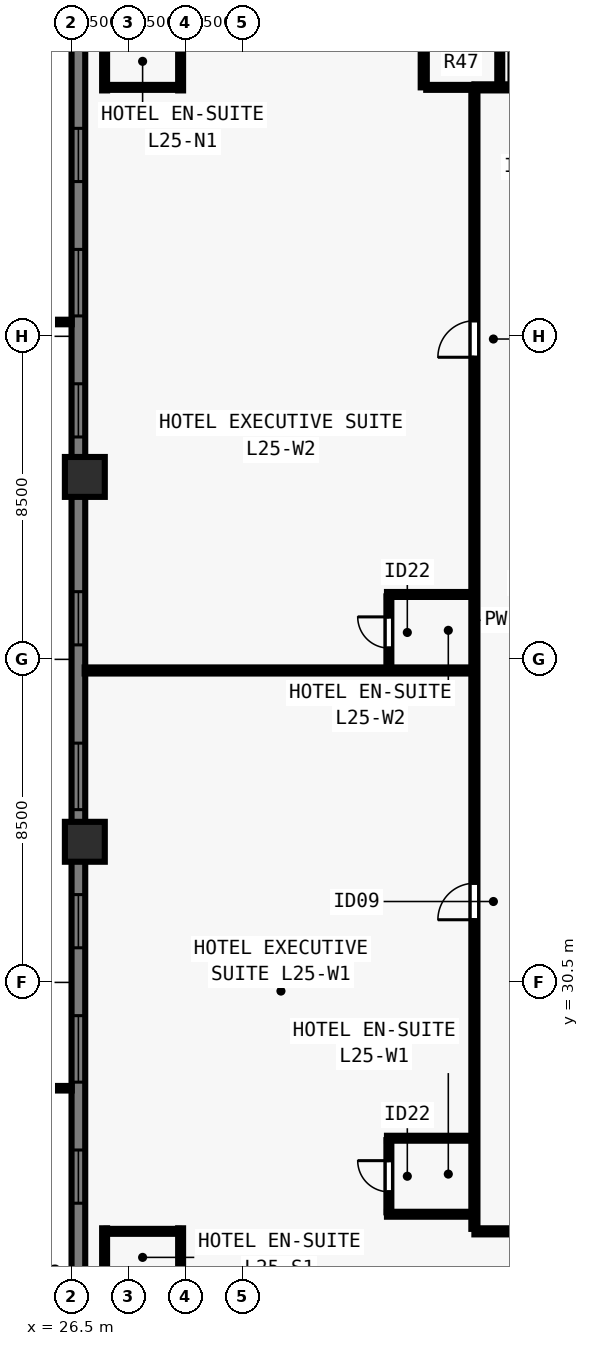
"""IFC4 building model, lengths in metres.
Left out: names, types, materials, properties, quantities, classifications, styles, units other than length and angle.
Written with IfcOpenShell. Run it as: python <this file> out.ifc"""

import sys

from ifc_helpers import new_model, si_unit, direction, frame, frame_2d, origin, origin_2d, place, context, subcontext, project, spatial, rectangle, extrude, element, fill, save


model = new_model("IFC4")
c1 = context("Model", 3, precision=1e-05, world=origin(), true_north=direction((0.0, 1.0)))
c2 = subcontext(c1, "Body", "Model", "MODEL_VIEW")
j1 = project(units=[si_unit("LENGTHUNIT", "METRE"), si_unit("PLANEANGLEUNIT", "RADIAN")], contexts=[c1])
p1 = place(None, origin())
s1 = spatial("IfcSite", under=j1, at=p1, CompositionType="ELEMENT")
p2 = place(p1, origin())
s2 = spatial("IfcBuilding", under=s1, at=p2, CompositionType="ELEMENT")
p3 = place(p2, frame((0.0, 0.0, 93.5)))
s3 = spatial("IfcBuildingStorey", under=s2, at=p3, CompositionType="ELEMENT", Elevation=93.5)
for number, where, z_axis, x_axis in (
    (1, (26.85, 43.8, 0.0), (0.0, 0.0, 1.0), (0.0, 1.0, 0.0)),
    (2, (26.85, 34.2, 0.0), (0.0, 0.0, 1.0), (0.0, 1.0, 0.0)),
):
    element("IfcColumn", number, at=place(p3, frame(where, z_axis=z_axis, x_axis=x_axis)), inside=s3, PredefinedType="COLUMN", context=c2, shape_type="SweptSolid", body=[
        extrude(rectangle(XDim=1.05, YDim=1.05, at=origin_2d()), origin(), (0.0, 0.0, 1.0), 3.5),
    ])
p4 = place(p3, frame((26.68, 16.5, 0.0), z_axis=(0.0, 0.0, 1.0), x_axis=(0.0, 1.0, 0.0)))
e3 = element("IfcWall", 3, at=p4, inside=s3, PredefinedType="SOLIDWALL", context=c2, shape_type="SweptSolid", body=[
    extrude(rectangle(XDim=44.662, YDim=0.36, at=frame_2d((22.331, 0.0))), origin(), (0.0, 0.0, 1.0), 3.24),
])
p5 = place(p4, frame((8.19, 0.0, 0.8)))
e4 = element("IfcOpeningElement", 4, at=p5, cuts=e3, PredefinedType="OPENING", context=c2, shape_type="SweptSolid", body=[
    extrude(rectangle(XDim=1.4, YDim=1.504, at=frame_2d((0.7, 0.752))), frame((0.0, 0.19, 0.0), z_axis=(0.0, -1.0, 0.0), x_axis=(1.0, 0.0, 0.0)), (0.0, 0.0, 1.0), 0.38),
])
p6 = place(p4, frame((11.375, 0.0, 0.8)))
e5 = element("IfcOpeningElement", 5, at=p6, cuts=e3, PredefinedType="OPENING", context=c2, shape_type="SweptSolid", body=[
    extrude(rectangle(XDim=1.75, YDim=1.504, at=frame_2d((0.875, 0.752))), frame((0.0, 0.19, 0.0), z_axis=(0.0, -1.0, 0.0), x_axis=(1.0, 0.0, 0.0)), (0.0, 0.0, 1.0), 0.38),
])
p7 = place(p4, frame((14.911, 0.0, 0.8)))
e6 = element("IfcOpeningElement", 6, at=p7, cuts=e3, PredefinedType="OPENING", context=c2, shape_type="SweptSolid", body=[
    extrude(rectangle(XDim=1.4, YDim=1.504, at=frame_2d((0.7, 0.752))), frame((0.0, 0.19, 0.0), z_axis=(0.0, -1.0, 0.0), x_axis=(1.0, 0.0, 0.0)), (0.0, 0.0, 1.0), 0.38),
])
p8 = place(p4, frame((18.546, 0.0, 0.8)))
e7 = element("IfcOpeningElement", 7, at=p8, cuts=e3, PredefinedType="OPENING", context=c2, shape_type="SweptSolid", body=[
    extrude(rectangle(XDim=1.75, YDim=1.504, at=frame_2d((0.875, 0.752))), frame((0.0, 0.19, 0.0), z_axis=(0.0, -1.0, 0.0), x_axis=(1.0, 0.0, 0.0)), (0.0, 0.0, 1.0), 0.38),
])
p9 = place(p4, frame((22.881, 0.0, 0.8)))
e8 = element("IfcOpeningElement", 8, at=p9, cuts=e3, PredefinedType="OPENING", context=c2, shape_type="SweptSolid", body=[
    extrude(rectangle(XDim=1.4, YDim=1.504, at=frame_2d((0.7, 0.752))), frame((0.0, 0.19, 0.0), z_axis=(0.0, -1.0, 0.0), x_axis=(1.0, 0.0, 0.0)), (0.0, 0.0, 1.0), 0.38),
])
p10 = place(p4, frame((28.351, 0.0, 0.8)))
e9 = element("IfcOpeningElement", 9, at=p10, cuts=e3, PredefinedType="OPENING", context=c2, shape_type="SweptSolid", body=[
    extrude(rectangle(XDim=1.4, YDim=1.504, at=frame_2d((0.7, 0.752))), frame((0.0, 0.19, 0.0), z_axis=(0.0, -1.0, 0.0), x_axis=(1.0, 0.0, 0.0)), (0.0, 0.0, 1.0), 0.38),
])
p11 = place(p4, frame((31.537, 0.0, 0.8)))
e10 = element("IfcOpeningElement", 10, at=p11, cuts=e3, PredefinedType="OPENING", context=c2, shape_type="SweptSolid", body=[
    extrude(rectangle(XDim=1.75, YDim=1.504, at=frame_2d((0.875, 0.752))), frame((0.0, 0.19, 0.0), z_axis=(0.0, -1.0, 0.0), x_axis=(1.0, 0.0, 0.0)), (0.0, 0.0, 1.0), 0.38),
])
p12 = place(p4, frame((35.072, 0.0, 0.8)))
e11 = element("IfcOpeningElement", 11, at=p12, cuts=e3, PredefinedType="OPENING", context=c2, shape_type="SweptSolid", body=[
    extrude(rectangle(XDim=1.4, YDim=1.504, at=frame_2d((0.7, 0.752))), frame((0.0, 0.19, 0.0), z_axis=(0.0, -1.0, 0.0), x_axis=(1.0, 0.0, 0.0)), (0.0, 0.0, 1.0), 0.38),
])
p13 = place(p3, frame((37.1, 23.95, 0.0), z_axis=(0.0, 0.0, 1.0), x_axis=(1.0, 0.0, 0.0)))
e12 = element("IfcWall", 12, at=p13, inside=s3, PredefinedType="PARTITIONING", context=c2, shape_type="SweptSolid", body=[
    extrude(rectangle(XDim=29.8, YDim=0.16, at=frame_2d((14.9, 0.0))), origin(), (0.0, 0.0, 1.0), 3.24),
])
p14 = place(p13, frame((2.571, 0.0, 0.0)))
e13 = element("IfcOpeningElement", 13, at=p14, cuts=e12, PredefinedType="OPENING", context=c2, shape_type="SweptSolid", body=[
    extrude(rectangle(XDim=0.96, YDim=2.15, at=frame_2d((0.48, 1.075))), frame((0.0, 0.09, 0.0), z_axis=(0.0, -1.0, 0.0), x_axis=(1.0, 0.0, 0.0)), (0.0, 0.0, 1.0), 0.18),
])
p15 = place(p13, frame((15.42, 0.0, 0.0)))
e14 = element("IfcOpeningElement", 14, at=p15, cuts=e12, PredefinedType="OPENING", context=c2, shape_type="SweptSolid", body=[
    extrude(rectangle(XDim=0.96, YDim=2.15, at=frame_2d((0.48, 1.075))), frame((0.0, 0.09, 0.0), z_axis=(0.0, -1.0, 0.0), x_axis=(1.0, 0.0, 0.0)), (0.0, 0.0, 1.0), 0.18),
])
p16 = place(p13, frame((27.269, 0.0, 0.0)))
e15 = element("IfcOpeningElement", 15, at=p16, cuts=e12, PredefinedType="OPENING", context=c2, shape_type="SweptSolid", body=[
    extrude(rectangle(XDim=0.96, YDim=2.15, at=frame_2d((0.48, 1.075))), frame((0.0, 0.09, 0.0), z_axis=(0.0, -1.0, 0.0), x_axis=(1.0, 0.0, 0.0)), (0.0, 0.0, 1.0), 0.18),
])
p17 = place(p3, frame((37.1, 54.05, 0.0), z_axis=(0.0, 0.0, 1.0), x_axis=(1.0, 0.0, 0.0)))
e16 = element("IfcWall", 16, at=p17, inside=s3, PredefinedType="PARTITIONING", context=c2, shape_type="SweptSolid", body=[
    extrude(rectangle(XDim=29.8, YDim=0.16, at=frame_2d((14.9, 0.0))), origin(), (0.0, 0.0, 1.0), 3.24),
])
p18 = place(p17, frame((0.91, 0.0, 0.0)))
e17 = element("IfcOpeningElement", 17, at=p18, cuts=e16, PredefinedType="OPENING", context=c2, shape_type="SweptSolid", body=[
    extrude(rectangle(XDim=0.96, YDim=2.15, at=frame_2d((0.48, 1.075))), frame((0.0, 0.09, 0.0), z_axis=(0.0, -1.0, 0.0), x_axis=(1.0, 0.0, 0.0)), (0.0, 0.0, 1.0), 0.18),
])
p19 = place(p17, frame((3.03, 0.0, 0.0)))
e18 = element("IfcOpeningElement", 18, at=p19, cuts=e16, PredefinedType="OPENING", context=c2, shape_type="SweptSolid", body=[
    extrude(rectangle(XDim=0.96, YDim=2.15, at=frame_2d((0.48, 1.075))), frame((0.0, 0.09, 0.0), z_axis=(0.0, -1.0, 0.0), x_axis=(1.0, 0.0, 0.0)), (0.0, 0.0, 1.0), 0.18),
])
p20 = place(p17, frame((11.39, 0.0, 0.0)))
e19 = element("IfcOpeningElement", 19, at=p20, cuts=e16, PredefinedType="OPENING", context=c2, shape_type="SweptSolid", body=[
    extrude(rectangle(XDim=0.96, YDim=2.15, at=frame_2d((0.48, 1.075))), frame((0.0, 0.09, 0.0), z_axis=(0.0, -1.0, 0.0), x_axis=(1.0, 0.0, 0.0)), (0.0, 0.0, 1.0), 0.18),
])
p21 = place(p17, frame((19.75, 0.0, 0.0)))
e20 = element("IfcOpeningElement", 20, at=p21, cuts=e16, PredefinedType="OPENING", context=c2, shape_type="SweptSolid", body=[
    extrude(rectangle(XDim=0.96, YDim=2.15, at=frame_2d((0.48, 1.075))), frame((0.0, 0.09, 0.0), z_axis=(0.0, -1.0, 0.0), x_axis=(1.0, 0.0, 0.0)), (0.0, 0.0, 1.0), 0.18),
])
p22 = place(p17, frame((26.931, 0.0, 0.0)))
e21 = element("IfcOpeningElement", 21, at=p22, cuts=e16, PredefinedType="OPENING", context=c2, shape_type="SweptSolid", body=[
    extrude(rectangle(XDim=0.96, YDim=2.15, at=frame_2d((0.48, 1.075))), frame((0.0, 0.09, 0.0), z_axis=(0.0, -1.0, 0.0), x_axis=(1.0, 0.0, 0.0)), (0.0, 0.0, 1.0), 0.18),
])
p23 = place(p17, frame((28.48, 0.0, 0.0)))
e22 = element("IfcOpeningElement", 22, at=p23, cuts=e16, PredefinedType="OPENING", context=c2, shape_type="SweptSolid", body=[
    extrude(rectangle(XDim=0.96, YDim=2.15, at=frame_2d((0.48, 1.075))), frame((0.0, 0.09, 0.0), z_axis=(0.0, -1.0, 0.0), x_axis=(1.0, 0.0, 0.0)), (0.0, 0.0, 1.0), 0.18),
])
p24 = place(p3, frame((37.1, 24.015, 0.0), z_axis=(0.0, 0.0, 1.0), x_axis=(0.0, 1.0, 0.0)))
e23 = element("IfcWall", 23, at=p24, inside=s3, PredefinedType="PARTITIONING", context=c2, shape_type="SweptSolid", body=[
    extrude(rectangle(XDim=29.97, YDim=0.16, at=frame_2d((14.985, 0.0))), origin(), (0.0, 0.0, 1.0), 3.24),
])
p25 = place(p24, frame((8.134, 0.0, 0.0)))
e24 = element("IfcOpeningElement", 24, at=p25, cuts=e23, PredefinedType="OPENING", context=c2, shape_type="SweptSolid", body=[
    extrude(rectangle(XDim=0.96, YDim=2.15, at=frame_2d((0.48, 1.075))), frame((0.0, 0.09, 0.0), z_axis=(0.0, -1.0, 0.0), x_axis=(1.0, 0.0, 0.0)), (0.0, 0.0, 1.0), 0.18),
])
p26 = place(p24, frame((22.934, 0.0, 0.0)))
e25 = element("IfcOpeningElement", 25, at=p26, cuts=e23, PredefinedType="OPENING", context=c2, shape_type="SweptSolid", body=[
    extrude(rectangle(XDim=0.96, YDim=2.15, at=frame_2d((0.48, 1.075))), frame((0.0, 0.09, 0.0), z_axis=(0.0, -1.0, 0.0), x_axis=(1.0, 0.0, 0.0)), (0.0, 0.0, 1.0), 0.18),
])
for number, where, z_axis, x_axis in (
    (26, (27.37, 21.65, 0.0), (0.0, 0.0, 1.0), (0.0, 1.0, 0.0)),
    (27, (29.37, 21.65, 0.0), (0.0, 0.0, 1.0), (0.0, 1.0, 0.0)),
):
    element("IfcWall", number, at=place(p3, frame(where, z_axis=z_axis, x_axis=x_axis)), inside=s3, PredefinedType="PLUMBINGWALL", context=c2, shape_type="SweptSolid", body=[
        extrude(rectangle(XDim=2.38, YDim=0.13, at=frame_2d((1.19, 0.0))), origin(), (0.0, 0.0, 1.0), 3.24),
    ])
p27 = place(p3, frame((27.42, 23.95, 0.0), z_axis=(0.0, 0.0, 1.0), x_axis=(1.0, 0.0, 0.0)))
e28 = element("IfcWall", 28, at=p27, inside=s3, PredefinedType="PLUMBINGWALL", context=c2, shape_type="SweptSolid", body=[
    extrude(rectangle(XDim=1.9, YDim=0.13, at=frame_2d((0.95, 0.0))), origin(), (0.0, 0.0, 1.0), 3.24),
])
for number, where, z_axis, x_axis in (
    (29, (27.37, 53.97, 0.0), (0.0, 0.0, 1.0), (0.0, 1.0, 0.0)),
    (30, (29.37, 53.97, 0.0), (0.0, 0.0, 1.0), (0.0, 1.0, 0.0)),
):
    element("IfcWall", number, at=place(p3, frame(where, z_axis=z_axis, x_axis=x_axis)), inside=s3, PredefinedType="PLUMBINGWALL", context=c2, shape_type="SweptSolid", body=[
        extrude(rectangle(XDim=2.38, YDim=0.13, at=frame_2d((1.19, 0.0))), origin(), (0.0, 0.0, 1.0), 3.24),
    ])
p28 = place(p3, frame((27.42, 54.05, 0.0), z_axis=(0.0, 0.0, 1.0), x_axis=(1.0, 0.0, 0.0)))
e31 = element("IfcWall", 31, at=p28, inside=s3, PredefinedType="PLUMBINGWALL", context=c2, shape_type="SweptSolid", body=[
    extrude(rectangle(XDim=1.9, YDim=0.13, at=frame_2d((0.95, 0.0))), origin(), (0.0, 0.0, 1.0), 3.24),
])
p29 = place(p3, frame((35.768, 54.05, 0.0), z_axis=(0.0, 0.0, 1.0), x_axis=(0.0, 1.0, 0.0)))
e32 = element("IfcWall", 32, at=p29, inside=s3, PredefinedType="PARTITIONING", context=c2, shape_type="SweptSolid", body=[
    extrude(rectangle(XDim=10.105, YDim=0.16, at=frame_2d((5.052, 0.0))), origin(), (0.0, 0.0, 1.0), 2.399),
])
p30 = place(p3, frame((37.768, 54.115, 0.0), z_axis=(0.0, 0.0, 1.0), x_axis=(0.0, 1.0, 0.0)))
e33 = element("IfcWall", 33, at=p30, inside=s3, PredefinedType="PLUMBINGWALL", context=c2, shape_type="SweptSolid", body=[
    extrude(rectangle(XDim=2.235, YDim=0.13, at=frame_2d((1.118, 0.0))), origin(), (0.0, 0.0, 1.0), 2.399),
])
p31 = place(p3, frame((35.833, 54.05, 0.0), z_axis=(0.0, 0.0, 1.0), x_axis=(1.0, 0.0, 0.0)))
e34 = element("IfcWall", 34, at=p31, inside=s3, PredefinedType="PLUMBINGWALL", context=c2, shape_type="SweptSolid", body=[
    extrude(rectangle(XDim=1.188, YDim=0.13, at=frame_2d((0.594, 0.0))), origin(), (0.0, 0.0, 1.0), 3.24),
])
p32 = place(p3, frame((34.8, 24.4, 0.0), z_axis=(0.0, 0.0, 1.0), x_axis=(1.0, 0.0, 0.0)))
e35 = element("IfcWall", 35, at=p32, inside=s3, PredefinedType="PLUMBINGWALL", context=c2, shape_type="SweptSolid", body=[
    extrude(rectangle(XDim=2.235, YDim=0.13, at=frame_2d((1.117, 0.0))), origin(), (0.0, 0.0, 1.0), 2.809),
])
p33 = place(p3, frame((34.8, 26.4, 0.0), z_axis=(0.0, 0.0, 1.0), x_axis=(1.0, 0.0, 0.0)))
e36 = element("IfcWall", 36, at=p33, inside=s3, PredefinedType="PLUMBINGWALL", context=c2, shape_type="SweptSolid", body=[
    extrude(rectangle(XDim=2.235, YDim=0.13, at=frame_2d((1.117, 0.0))), origin(), (0.0, 0.0, 1.0), 3.24),
])
p34 = place(p3, frame((34.85, 24.45, 0.0), z_axis=(0.0, 0.0, 1.0), x_axis=(0.0, 1.0, 0.0)))
e37 = element("IfcWall", 37, at=p34, inside=s3, PredefinedType="PLUMBINGWALL", context=c2, shape_type="SweptSolid", body=[
    extrude(rectangle(XDim=1.9, YDim=0.13, at=frame_2d((0.95, 0.0))), origin(), (0.0, 0.0, 1.0), 3.24),
])
p35 = place(p34, frame((0.54, 0.0, 0.0)))
e38 = element("IfcOpeningElement", 38, at=p35, cuts=e37, PredefinedType="OPENING", context=c2, shape_type="SweptSolid", body=[
    extrude(rectangle(XDim=0.82, YDim=2.1, at=frame_2d((0.41, 1.05))), frame((0.0, 0.075, 0.0), z_axis=(0.0, -1.0, 0.0), x_axis=(1.0, 0.0, 0.0)), (0.0, 0.0, 1.0), 0.15),
])
p36 = place(p3, frame((26.845, 38.708, 0.0), z_axis=(0.0, 0.0, 1.0), x_axis=(1.0, 0.0, 0.0)))
e39 = element("IfcWall", 39, at=p36, inside=s3, PredefinedType="PARTITIONING", context=c2, shape_type="SweptSolid", body=[
    extrude(rectangle(XDim=10.19, YDim=0.16, at=frame_2d((5.095, 0.0))), origin(), (0.0, 0.0, 1.0), 2.809),
])
p37 = place(p3, frame((34.8, 40.708, 0.0), z_axis=(0.0, 0.0, 1.0), x_axis=(1.0, 0.0, 0.0)))
e40 = element("IfcWall", 40, at=p37, inside=s3, PredefinedType="PLUMBINGWALL", context=c2, shape_type="SweptSolid", body=[
    extrude(rectangle(XDim=2.235, YDim=0.13, at=frame_2d((1.117, 0.0))), origin(), (0.0, 0.0, 1.0), 2.809),
])
p38 = place(p3, frame((34.85, 38.772, 0.0), z_axis=(0.0, 0.0, 1.0), x_axis=(0.0, 1.0, 0.0)))
e41 = element("IfcWall", 41, at=p38, inside=s3, PredefinedType="PLUMBINGWALL", context=c2, shape_type="SweptSolid", body=[
    extrude(rectangle(XDim=1.885, YDim=0.13, at=frame_2d((0.942, 0.0))), origin(), (0.0, 0.0, 1.0), 3.24),
])
p39 = place(p38, frame((0.525, 0.0, 0.0)))
e42 = element("IfcOpeningElement", 42, at=p39, cuts=e41, PredefinedType="OPENING", context=c2, shape_type="SweptSolid", body=[
    extrude(rectangle(XDim=0.82, YDim=2.1, at=frame_2d((0.41, 1.05))), frame((0.0, 0.075, 0.0), z_axis=(0.0, -1.0, 0.0), x_axis=(1.0, 0.0, 0.0)), (0.0, 0.0, 1.0), 0.15),
])
p40 = place(p5, origin())
e43 = element("IfcWindow", 43, at=p40, inside=s3, PartitioningType="SINGLE_PANEL", PredefinedType="WINDOW", context=c2, shape_type="SweptSolid", body=[
    extrude(rectangle(XDim=1.4, YDim=1.504, at=frame_2d((0.7, 0.752))), frame((0.0, -0.05, 0.0), z_axis=(0.0, -1.0, 0.0), x_axis=(1.0, 0.0, 0.0)), (0.0, 0.0, 1.0), 0.06),
])
fill(e4, e43)
p41 = place(p6, origin())
e44 = element("IfcWindow", 44, at=p41, inside=s3, PartitioningType="SINGLE_PANEL", PredefinedType="WINDOW", context=c2, shape_type="SweptSolid", body=[
    extrude(rectangle(XDim=1.75, YDim=1.504, at=frame_2d((0.875, 0.752))), frame((0.0, -0.05, 0.0), z_axis=(0.0, -1.0, 0.0), x_axis=(1.0, 0.0, 0.0)), (0.0, 0.0, 1.0), 0.06),
])
fill(e5, e44)
p42 = place(p7, origin())
e45 = element("IfcWindow", 45, at=p42, inside=s3, PartitioningType="SINGLE_PANEL", PredefinedType="WINDOW", context=c2, shape_type="SweptSolid", body=[
    extrude(rectangle(XDim=1.4, YDim=1.504, at=frame_2d((0.7, 0.752))), frame((0.0, -0.05, 0.0), z_axis=(0.0, -1.0, 0.0), x_axis=(1.0, 0.0, 0.0)), (0.0, 0.0, 1.0), 0.06),
])
fill(e6, e45)
p43 = place(p8, origin())
e46 = element("IfcWindow", 46, at=p43, inside=s3, PartitioningType="SINGLE_PANEL", PredefinedType="WINDOW", context=c2, shape_type="SweptSolid", body=[
    extrude(rectangle(XDim=1.75, YDim=1.504, at=frame_2d((0.875, 0.752))), frame((0.0, -0.05, 0.0), z_axis=(0.0, -1.0, 0.0), x_axis=(1.0, 0.0, 0.0)), (0.0, 0.0, 1.0), 0.06),
])
fill(e7, e46)
p44 = place(p9, origin())
e47 = element("IfcWindow", 47, at=p44, inside=s3, PartitioningType="SINGLE_PANEL", PredefinedType="WINDOW", context=c2, shape_type="SweptSolid", body=[
    extrude(rectangle(XDim=1.4, YDim=1.504, at=frame_2d((0.7, 0.752))), frame((0.0, -0.05, 0.0), z_axis=(0.0, -1.0, 0.0), x_axis=(1.0, 0.0, 0.0)), (0.0, 0.0, 1.0), 0.06),
])
fill(e8, e47)
p45 = place(p10, origin())
e48 = element("IfcWindow", 48, at=p45, inside=s3, PartitioningType="SINGLE_PANEL", PredefinedType="WINDOW", context=c2, shape_type="SweptSolid", body=[
    extrude(rectangle(XDim=1.4, YDim=1.504, at=frame_2d((0.7, 0.752))), frame((0.0, -0.05, 0.0), z_axis=(0.0, -1.0, 0.0), x_axis=(1.0, 0.0, 0.0)), (0.0, 0.0, 1.0), 0.06),
])
fill(e9, e48)
p46 = place(p11, origin())
e49 = element("IfcWindow", 49, at=p46, inside=s3, PartitioningType="SINGLE_PANEL", PredefinedType="WINDOW", context=c2, shape_type="SweptSolid", body=[
    extrude(rectangle(XDim=1.75, YDim=1.504, at=frame_2d((0.875, 0.752))), frame((0.0, -0.05, 0.0), z_axis=(0.0, -1.0, 0.0), x_axis=(1.0, 0.0, 0.0)), (0.0, 0.0, 1.0), 0.06),
])
fill(e10, e49)
p47 = place(p12, origin())
e50 = element("IfcWindow", 50, at=p47, inside=s3, PartitioningType="SINGLE_PANEL", PredefinedType="WINDOW", context=c2, shape_type="SweptSolid", body=[
    extrude(rectangle(XDim=1.4, YDim=1.504, at=frame_2d((0.7, 0.752))), frame((0.0, -0.05, 0.0), z_axis=(0.0, -1.0, 0.0), x_axis=(1.0, 0.0, 0.0)), (0.0, 0.0, 1.0), 0.06),
])
fill(e11, e50)
p48 = place(p18, origin())
e51 = element("IfcDoor", 51, at=p48, inside=s3, OperationType="SINGLE_SWING_LEFT", PredefinedType="DOOR", context=c2, shape_type="SweptSolid", body=[
    extrude(rectangle(XDim=0.96, YDim=2.15, at=frame_2d((0.48, 1.075))), frame((0.0, 0.025, 0.0), z_axis=(0.0, -1.0, 0.0), x_axis=(1.0, 0.0, 0.0)), (0.0, 0.0, 1.0), 0.05),
])
fill(e17, e51)
p49 = place(p35, origin())
e52 = element("IfcDoor", 52, at=p49, inside=s3, OperationType="SINGLE_SWING_RIGHT", PredefinedType="DOOR", context=c2, shape_type="SweptSolid", body=[
    extrude(rectangle(XDim=0.82, YDim=2.1, at=frame_2d((0.41, 1.05))), frame((0.0, 0.025, 0.0), z_axis=(0.0, -1.0, 0.0), x_axis=(1.0, 0.0, 0.0)), (0.0, 0.0, 1.0), 0.05),
])
fill(e38, e52)
p50 = place(p25, origin())
e53 = element("IfcDoor", 53, at=p50, inside=s3, OperationType="SINGLE_SWING_LEFT", PredefinedType="DOOR", context=c2, shape_type="SweptSolid", body=[
    extrude(rectangle(XDim=0.96, YDim=2.15, at=frame_2d((0.48, 1.075))), frame((0.0, 0.025, 0.0), z_axis=(0.0, -1.0, 0.0), x_axis=(1.0, 0.0, 0.0)), (0.0, 0.0, 1.0), 0.05),
])
fill(e24, e53)
p51 = place(p39, origin())
e54 = element("IfcDoor", 54, at=p51, inside=s3, OperationType="SINGLE_SWING_RIGHT", PredefinedType="DOOR", context=c2, shape_type="SweptSolid", body=[
    extrude(rectangle(XDim=0.82, YDim=2.1, at=frame_2d((0.41, 1.05))), frame((0.0, 0.025, 0.0), z_axis=(0.0, -1.0, 0.0), x_axis=(1.0, 0.0, 0.0)), (0.0, 0.0, 1.0), 0.05),
])
fill(e42, e54)
p52 = place(p26, origin())
e55 = element("IfcDoor", 55, at=p52, inside=s3, OperationType="SINGLE_SWING_LEFT", PredefinedType="DOOR", context=c2, shape_type="SweptSolid", body=[
    extrude(rectangle(XDim=0.96, YDim=2.15, at=frame_2d((0.48, 1.075))), frame((0.0, 0.025, 0.0), z_axis=(0.0, -1.0, 0.0), x_axis=(1.0, 0.0, 0.0)), (0.0, 0.0, 1.0), 0.05),
])
fill(e25, e55)
save(model, sys.argv[1])
